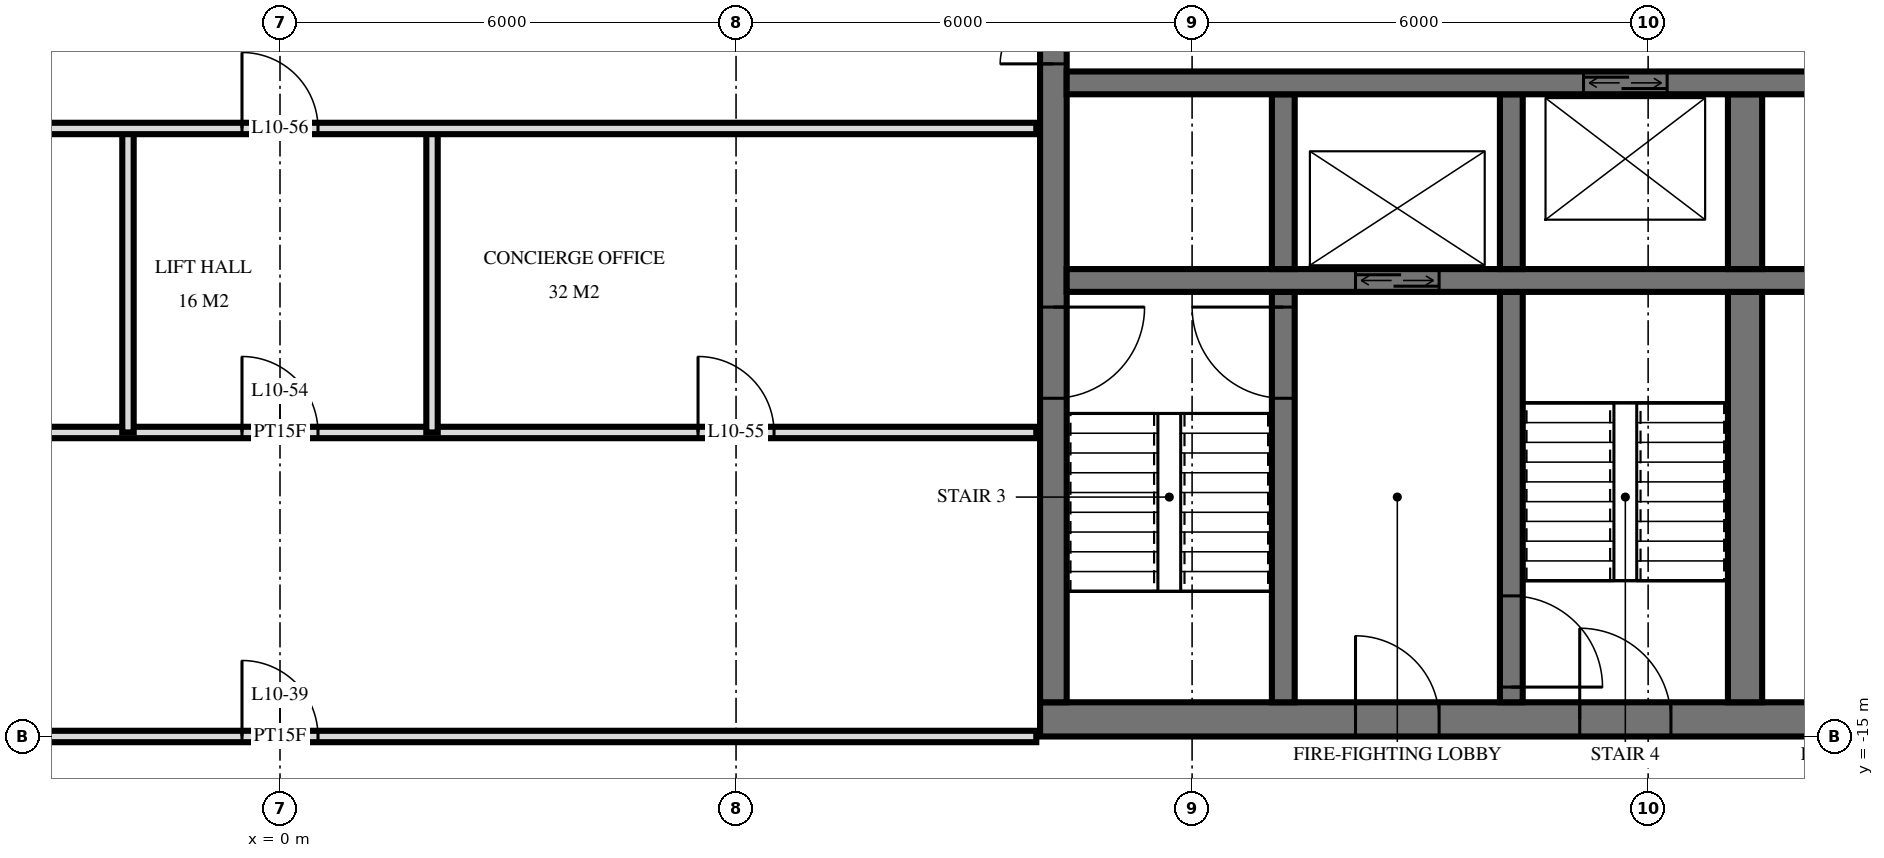
"""IFC4 building model, lengths in metres.
Left out: names, types, materials, properties, quantities, classifications, styles, units other than length and angle.
Written with IfcOpenShell. Run it as: python <this file> out.ifc"""

import sys

from ifc_helpers import new_model, si_unit, direction, frame, frame_2d, origin, place, context, subcontext, project, spatial, rectangle, extrude, element, fill, save


model = new_model("IFC4")
c1 = context("Model", 3, precision=1e-05, world=origin(), true_north=direction((0.0, 1.0)))
c2 = subcontext(c1, "Body", "Model", "MODEL_VIEW")
j1 = project(units=[si_unit("LENGTHUNIT", "METRE"), si_unit("PLANEANGLEUNIT", "RADIAN")], contexts=[c1])
p1 = place(None, origin())
s1 = spatial("IfcSite", under=j1, at=p1, CompositionType="ELEMENT")
p2 = place(p1, origin())
s2 = spatial("IfcBuilding", under=s1, at=p2, CompositionType="ELEMENT")
p3 = place(p2, frame((0.0, 0.0, 45.6)))
s3 = spatial("IfcBuildingStorey", under=s2, at=p3, CompositionType="ELEMENT", Elevation=45.6)
p4 = place(p3, frame((10.0, -14.775, 0.0), z_axis=(0.0, 0.0, 1.0), x_axis=(1.0, 0.0, 0.0)))
e1 = element("IfcWall", 1, at=p4, inside=s3, PredefinedType="SHEAR", context=c2, shape_type="SweptSolid", body=[
    extrude(rectangle(XDim=19.5, YDim=0.45, at=frame_2d((9.75, 0.0))), origin(), (0.0, 0.0, 1.0), 3.6),
])
p5 = place(p4, frame((7.1, 0.0, 0.0)))
e2 = element("IfcOpeningElement", 2, at=p5, cuts=e1, PredefinedType="OPENING", context=c2, shape_type="SweptSolid", body=[
    extrude(rectangle(XDim=1.2, YDim=2.1, at=frame_2d((0.6, 1.05))), frame((0.0, 0.235, 0.0), z_axis=(0.0, -1.0, 0.0), x_axis=(1.0, 0.0, 0.0)), (0.0, 0.0, 1.0), 0.47),
])
p6 = place(p4, frame((4.15, 0.0, 0.0)))
e3 = element("IfcOpeningElement", 3, at=p6, cuts=e1, PredefinedType="OPENING", context=c2, shape_type="SweptSolid", body=[
    extrude(rectangle(XDim=1.1, YDim=2.1, at=frame_2d((0.55, 1.05))), frame((0.0, 0.235, 0.0), z_axis=(0.0, -1.0, 0.0), x_axis=(1.0, 0.0, 0.0)), (0.0, 0.0, 1.0), 0.47),
])
p7 = place(p4, frame((10.1, 0.0, 0.0)))
e4 = element("IfcOpeningElement", 4, at=p7, cuts=e1, PredefinedType="OPENING", context=c2, shape_type="SweptSolid", body=[
    extrude(rectangle(XDim=0.9, YDim=2.1, at=frame_2d((0.45, 1.05))), frame((0.0, 0.235, 0.0), z_axis=(0.0, -1.0, 0.0), x_axis=(1.0, 0.0, 0.0)), (0.0, 0.0, 1.0), 0.47),
])
p8 = place(p4, frame((12.45, 0.0, 0.0)))
e5 = element("IfcOpeningElement", 5, at=p8, cuts=e1, PredefinedType="OPENING", context=c2, shape_type="SweptSolid", body=[
    extrude(rectangle(XDim=1.0, YDim=2.1, at=frame_2d((0.5, 1.05))), frame((0.0, 0.235, 0.0), z_axis=(0.0, -1.0, 0.0), x_axis=(1.0, 0.0, 0.0)), (0.0, 0.0, 1.0), 0.47),
])
p9 = place(p4, frame((14.913, 0.0, 0.0)))
e6 = element("IfcOpeningElement", 6, at=p9, cuts=e1, PredefinedType="OPENING", context=c2, shape_type="SweptSolid", body=[
    extrude(rectangle(XDim=1.0, YDim=2.1, at=frame_2d((0.5, 1.05))), frame((0.0, 0.235, 0.0), z_axis=(0.0, -1.0, 0.0), x_axis=(1.0, 0.0, 0.0)), (0.0, 0.0, 1.0), 0.47),
])
p10 = place(p4, frame((16.65, 0.0, 0.0)))
e7 = element("IfcOpeningElement", 7, at=p10, cuts=e1, PredefinedType="OPENING", context=c2, shape_type="SweptSolid", body=[
    extrude(rectangle(XDim=1.0, YDim=2.1, at=frame_2d((0.5, 1.05))), frame((0.0, 0.235, 0.0), z_axis=(0.0, -1.0, 0.0), x_axis=(1.0, 0.0, 0.0)), (0.0, 0.0, 1.0), 0.47),
])
p11 = place(p4, frame((18.025, 0.0, 0.0)))
e8 = element("IfcOpeningElement", 8, at=p11, cuts=e1, PredefinedType="OPENING", context=c2, shape_type="SweptSolid", body=[
    extrude(rectangle(XDim=1.0, YDim=2.1, at=frame_2d((0.5, 1.05))), frame((0.0, 0.235, 0.0), z_axis=(0.0, -1.0, 0.0), x_axis=(1.0, 0.0, 0.0)), (0.0, 0.0, 1.0), 0.47),
])
p12 = place(p3, frame((10.175, -14.55, 0.0), z_axis=(0.0, 0.0, 1.0), x_axis=(0.0, 1.0, 0.0)))
e9 = element("IfcWall", 9, at=p12, inside=s3, PredefinedType="SHEAR", context=c2, shape_type="SweptSolid", body=[
    extrude(rectangle(XDim=14.1, YDim=0.35, at=frame_2d((7.05, 0.0))), origin(), (0.0, 0.0, 1.0), 3.6),
])
p13 = place(p12, frame((8.4, 0.0, 0.0)))
e10 = element("IfcOpeningElement", 10, at=p13, cuts=e9, PredefinedType="OPENING", context=c2, shape_type="SweptSolid", body=[
    extrude(rectangle(XDim=1.4, YDim=2.4, at=frame_2d((0.7, 1.2))), frame((0.0, 0.185, 0.0), z_axis=(0.0, -1.0, 0.0), x_axis=(1.0, 0.0, 0.0)), (0.0, 0.0, 1.0), 0.37),
])
p14 = place(p12, frame((10.0, 0.0, 0.0)))
e11 = element("IfcOpeningElement", 11, at=p14, cuts=e9, PredefinedType="OPENING", context=c2, shape_type="SweptSolid", body=[
    extrude(rectangle(XDim=1.4, YDim=2.4, at=frame_2d((0.7, 1.2))), frame((0.0, 0.185, 0.0), z_axis=(0.0, -1.0, 0.0), x_axis=(1.0, 0.0, 0.0)), (0.0, 0.0, 1.0), 0.37),
])
p15 = place(p12, frame((4.0, 0.0, 0.0)))
e12 = element("IfcOpeningElement", 12, at=p15, cuts=e9, PredefinedType="OPENING", context=c2, shape_type="SweptSolid", body=[
    extrude(rectangle(XDim=1.2, YDim=2.1, at=frame_2d((0.6, 1.05))), frame((0.0, 0.185, 0.0), z_axis=(0.0, -1.0, 0.0), x_axis=(1.0, 0.0, 0.0)), (0.0, 0.0, 1.0), 0.37),
])
p16 = place(p3, frame((10.35, -6.4, 0.0), z_axis=(0.0, 0.0, 1.0), x_axis=(1.0, 0.0, 0.0)))
e13 = element("IfcWall", 13, at=p16, inside=s3, PredefinedType="SHEAR", context=c2, shape_type="SweptSolid", body=[
    extrude(rectangle(XDim=18.7, YDim=0.3, at=frame_2d((9.35, 0.0))), origin(), (0.0, 0.0, 1.0), 3.6),
])
p17 = place(p16, frame((14.65, 0.0, 0.0)))
e14 = element("IfcOpeningElement", 14, at=p17, cuts=e13, PredefinedType="OPENING", context=c2, shape_type="SweptSolid", body=[
    extrude(rectangle(XDim=1.1, YDim=2.1, at=frame_2d((0.55, 1.05))), frame((0.0, 0.16, 0.0), z_axis=(0.0, -1.0, 0.0), x_axis=(1.0, 0.0, 0.0)), (0.0, 0.0, 1.0), 0.32),
])
p18 = place(p16, frame((17.05, 0.0, 0.0)))
e15 = element("IfcOpeningElement", 15, at=p18, cuts=e13, PredefinedType="OPENING", context=c2, shape_type="SweptSolid", body=[
    extrude(rectangle(XDim=1.1, YDim=2.1, at=frame_2d((0.55, 1.05))), frame((0.0, 0.16, 0.0), z_axis=(0.0, -1.0, 0.0), x_axis=(1.0, 0.0, 0.0)), (0.0, 0.0, 1.0), 0.32),
])
p19 = place(p16, frame((6.8, 0.0, 0.0)))
e16 = element("IfcOpeningElement", 16, at=p19, cuts=e13, PredefinedType="OPENING", context=c2, shape_type="SweptSolid", body=[
    extrude(rectangle(XDim=1.1, YDim=2.1, at=frame_2d((0.55, 1.05))), frame((0.0, 0.16, 0.0), z_axis=(0.0, -1.0, 0.0), x_axis=(1.0, 0.0, 0.0)), (0.0, 0.0, 1.0), 0.32),
])
p20 = place(p16, frame((12.1, 0.0, 0.0)))
e17 = element("IfcOpeningElement", 17, at=p20, cuts=e13, PredefinedType="OPENING", context=c2, shape_type="SweptSolid", body=[
    extrude(rectangle(XDim=1.0, YDim=2.1, at=frame_2d((0.5, 1.05))), frame((0.0, 0.16, 0.0), z_axis=(0.0, -1.0, 0.0), x_axis=(1.0, 0.0, 0.0)), (0.0, 0.0, 1.0), 0.32),
])
p21 = place(p3, frame((10.35, -9.0, 0.0), z_axis=(0.0, 0.0, 1.0), x_axis=(1.0, 0.0, 0.0)))
e18 = element("IfcWall", 18, at=p21, inside=s3, PredefinedType="SHEAR", context=c2, shape_type="SweptSolid", body=[
    extrude(rectangle(XDim=18.7, YDim=0.3, at=frame_2d((9.35, 0.0))), origin(), (0.0, 0.0, 1.0), 3.6),
])
p22 = place(p21, frame((3.8, 0.0, 0.0)))
e19 = element("IfcOpeningElement", 19, at=p22, cuts=e18, PredefinedType="OPENING", context=c2, shape_type="SweptSolid", body=[
    extrude(rectangle(XDim=1.1, YDim=2.1, at=frame_2d((0.55, 1.05))), frame((0.0, 0.16, 0.0), z_axis=(0.0, -1.0, 0.0), x_axis=(1.0, 0.0, 0.0)), (0.0, 0.0, 1.0), 0.32),
])
p23 = place(p3, frame((13.2, -8.85, 0.0), z_axis=(0.0, 0.0, 1.0), x_axis=(0.0, 1.0, 0.0)))
e20 = element("IfcWall", 20, at=p23, inside=s3, PredefinedType="SHEAR", context=c2, shape_type="SweptSolid", body=[
    extrude(rectangle(XDim=2.3, YDim=0.3, at=frame_2d((1.15, 0.0))), origin(), (0.0, 0.0, 1.0), 3.6),
])
p24 = place(p3, frame((13.2, -14.55, 0.0), z_axis=(0.0, 0.0, 1.0), x_axis=(0.0, 1.0, 0.0)))
e21 = element("IfcWall", 21, at=p24, inside=s3, PredefinedType="SHEAR", context=c2, shape_type="SweptSolid", body=[
    extrude(rectangle(XDim=5.4, YDim=0.3, at=frame_2d((2.7, 0.0))), origin(), (0.0, 0.0, 1.0), 3.6),
])
p25 = place(p24, frame((4.0, 0.0, 0.0)))
e22 = element("IfcOpeningElement", 22, at=p25, cuts=e21, PredefinedType="OPENING", context=c2, shape_type="SweptSolid", body=[
    extrude(rectangle(XDim=1.2, YDim=2.1, at=frame_2d((0.6, 1.05))), frame((0.0, 0.16, 0.0), z_axis=(0.0, -1.0, 0.0), x_axis=(1.0, 0.0, 0.0)), (0.0, 0.0, 1.0), 0.32),
])
p26 = place(p3, frame((16.2, -8.85, 0.0), z_axis=(0.0, 0.0, 1.0), x_axis=(0.0, 1.0, 0.0)))
e23 = element("IfcWall", 23, at=p26, inside=s3, PredefinedType="SHEAR", context=c2, shape_type="SweptSolid", body=[
    extrude(rectangle(XDim=2.3, YDim=0.3, at=frame_2d((1.15, 0.0))), origin(), (0.0, 0.0, 1.0), 3.6),
])
p27 = place(p3, frame((16.2, -14.55, 0.0), z_axis=(0.0, 0.0, 1.0), x_axis=(0.0, 1.0, 0.0)))
e24 = element("IfcWall", 24, at=p27, inside=s3, PredefinedType="SHEAR", context=c2, shape_type="SweptSolid", body=[
    extrude(rectangle(XDim=5.4, YDim=0.3, at=frame_2d((2.7, 0.0))), origin(), (0.0, 0.0, 1.0), 3.6),
])
p28 = place(p27, frame((0.2, 0.0, 0.0)))
e25 = element("IfcOpeningElement", 25, at=p28, cuts=e24, PredefinedType="OPENING", context=c2, shape_type="SweptSolid", body=[
    extrude(rectangle(XDim=1.2, YDim=2.1, at=frame_2d((0.6, 1.05))), frame((0.0, 0.16, 0.0), z_axis=(0.0, -1.0, 0.0), x_axis=(1.0, 0.0, 0.0)), (0.0, 0.0, 1.0), 0.32),
])
p29 = place(p3, frame((19.275, -8.85, 0.0), z_axis=(0.0, 0.0, 1.0), x_axis=(0.0, 1.0, 0.0)))
e26 = element("IfcWall", 26, at=p29, inside=s3, PredefinedType="SHEAR", context=c2, shape_type="SweptSolid", body=[
    extrude(rectangle(XDim=2.3, YDim=0.45, at=frame_2d((1.15, 0.0))), origin(), (0.0, 0.0, 1.0), 3.6),
])
p30 = place(p3, frame((19.275, -14.55, 0.0), z_axis=(0.0, 0.0, 1.0), x_axis=(0.0, 1.0, 0.0)))
e27 = element("IfcWall", 27, at=p30, inside=s3, PredefinedType="SHEAR", context=c2, shape_type="SweptSolid", body=[
    extrude(rectangle(XDim=5.4, YDim=0.45, at=frame_2d((2.7, 0.0))), origin(), (0.0, 0.0, 1.0), 3.6),
])
for number, where, z_axis, x_axis in (
    (28, (2.0, -11.0, 0.0), (0.0, 0.0, 1.0), (0.0, 1.0, 0.0)),
    (29, (-2.0, -11.0, 0.0), (0.0, 0.0, 1.0), (0.0, 1.0, 0.0)),
):
    element("IfcWall", number, at=place(p3, frame(where, z_axis=z_axis, x_axis=x_axis)), inside=s3, PredefinedType="PARTITIONING", context=c2, shape_type="SweptSolid", body=[
        extrude(rectangle(XDim=4.0, YDim=0.15, at=frame_2d((2.0, 0.0))), origin(), (0.0, 0.0, 1.0), 3.32),
    ])
p31 = place(p3, frame((-9.95, -15.0, 0.0), z_axis=(0.0, 0.0, 1.0), x_axis=(1.0, 0.0, 0.0)))
e30 = element("IfcWall", 30, at=p31, inside=s3, PredefinedType="PARTITIONING", context=c2, shape_type="SweptSolid", body=[
    extrude(rectangle(XDim=19.9, YDim=0.15, at=frame_2d((9.95, 0.0))), origin(), (0.0, 0.0, 1.0), 2.684),
])
p32 = place(p31, frame((9.45, 0.0, 0.0)))
e31 = element("IfcOpeningElement", 31, at=p32, cuts=e30, PredefinedType="OPENING", context=c2, shape_type="SweptSolid", body=[
    extrude(rectangle(XDim=1.0, YDim=2.1, at=frame_2d((0.5, 1.05))), frame((0.0, 0.085, 0.0), z_axis=(0.0, -1.0, 0.0), x_axis=(1.0, 0.0, 0.0)), (0.0, 0.0, 1.0), 0.17),
])
p33 = place(p3, frame((-9.95, -11.0, 0.0), z_axis=(0.0, 0.0, 1.0), x_axis=(1.0, 0.0, 0.0)))
e32 = element("IfcWall", 32, at=p33, inside=s3, PredefinedType="PARTITIONING", context=c2, shape_type="SweptSolid", body=[
    extrude(rectangle(XDim=19.9, YDim=0.15, at=frame_2d((9.95, 0.0))), origin(), (0.0, 0.0, 1.0), 3.32),
])
p34 = place(p33, frame((9.45, 0.0, 0.0)))
e33 = element("IfcOpeningElement", 33, at=p34, cuts=e32, PredefinedType="OPENING", context=c2, shape_type="SweptSolid", body=[
    extrude(rectangle(XDim=1.0, YDim=2.1, at=frame_2d((0.5, 1.05))), frame((0.0, 0.085, 0.0), z_axis=(0.0, -1.0, 0.0), x_axis=(1.0, 0.0, 0.0)), (0.0, 0.0, 1.0), 0.17),
])
p35 = place(p33, frame((15.45, 0.0, 0.0)))
e34 = element("IfcOpeningElement", 34, at=p35, cuts=e32, PredefinedType="OPENING", context=c2, shape_type="SweptSolid", body=[
    extrude(rectangle(XDim=1.0, YDim=2.1, at=frame_2d((0.5, 1.05))), frame((0.0, 0.085, 0.0), z_axis=(0.0, -1.0, 0.0), x_axis=(1.0, 0.0, 0.0)), (0.0, 0.0, 1.0), 0.17),
])
p36 = place(p3, frame((-9.95, -7.0, 0.0), z_axis=(0.0, 0.0, 1.0), x_axis=(1.0, 0.0, 0.0)))
e35 = element("IfcWall", 35, at=p36, inside=s3, PredefinedType="PARTITIONING", context=c2, shape_type="SweptSolid", body=[
    extrude(rectangle(XDim=19.9, YDim=0.15, at=frame_2d((9.95, 0.0))), origin(), (0.0, 0.0, 1.0), 3.32),
])
p37 = place(p36, frame((9.45, 0.0, 0.0)))
e36 = element("IfcOpeningElement", 36, at=p37, cuts=e35, PredefinedType="OPENING", context=c2, shape_type="SweptSolid", body=[
    extrude(rectangle(XDim=1.0, YDim=2.1, at=frame_2d((0.5, 1.05))), frame((0.0, 0.085, 0.0), z_axis=(0.0, -1.0, 0.0), x_axis=(1.0, 0.0, 0.0)), (0.0, 0.0, 1.0), 0.17),
])
p38 = place(p36, frame((3.45, 0.0, 0.0)))
e37 = element("IfcOpeningElement", 37, at=p38, cuts=e35, PredefinedType="OPENING", context=c2, shape_type="SweptSolid", body=[
    extrude(rectangle(XDim=1.0, YDim=2.1, at=frame_2d((0.5, 1.05))), frame((0.0, 0.085, 0.0), z_axis=(0.0, -1.0, 0.0), x_axis=(1.0, 0.0, 0.0)), (0.0, 0.0, 1.0), 0.17),
])
p39 = place(p22, origin())
e38 = element("IfcDoor", 38, at=p39, inside=s3, OperationType="DOUBLE_DOOR_SLIDING", PredefinedType="USERDEFINED", context=c2, shape_type="SweptSolid", body=[
    extrude(rectangle(XDim=1.1, YDim=2.1, at=frame_2d((0.55, 1.05))), frame((0.0, 0.025, 0.0), z_axis=(0.0, -1.0, 0.0), x_axis=(1.0, 0.0, 0.0)), (0.0, 0.0, 1.0), 0.05),
])
fill(e19, e38)
p40 = place(p19, origin())
e39 = element("IfcDoor", 39, at=p40, inside=s3, OperationType="DOUBLE_DOOR_SLIDING", PredefinedType="USERDEFINED", context=c2, shape_type="SweptSolid", body=[
    extrude(rectangle(XDim=1.1, YDim=2.1, at=frame_2d((0.55, 1.05))), frame((0.0, 0.025, 0.0), z_axis=(0.0, -1.0, 0.0), x_axis=(1.0, 0.0, 0.0)), (0.0, 0.0, 1.0), 0.05),
])
fill(e16, e39)
p41 = place(p13, origin())
e40 = element("IfcDoor", 40, at=p41, inside=s3, OperationType="DOUBLE_DOOR_SINGLE_SWING", PredefinedType="DOOR", context=c2, shape_type="SweptSolid", body=[
    extrude(rectangle(XDim=1.4, YDim=2.4, at=frame_2d((0.7, 1.2))), frame((0.0, 0.025, 0.0), z_axis=(0.0, -1.0, 0.0), x_axis=(1.0, 0.0, 0.0)), (0.0, 0.0, 1.0), 0.05),
])
fill(e10, e40)
p42 = place(p15, frame((0.6, 0.0, 0.0), z_axis=(0.0, 0.0, 1.0), x_axis=(-1.0, 0.0, 0.0)))
e41 = element("IfcDoor", 41, at=p42, inside=s3, OperationType="SINGLE_SWING_RIGHT", PredefinedType="DOOR", context=c2, shape_type="SweptSolid", body=[
    extrude(rectangle(XDim=1.2, YDim=2.1, at=frame_2d((0.0, 1.05))), frame((0.0, -0.025, 0.0), z_axis=(0.0, 1.0, 0.0), x_axis=(-1.0, 0.0, 0.0)), (0.0, 0.0, 1.0), 0.05),
])
fill(e12, e41)
p43 = place(p5, origin())
e42 = element("IfcDoor", 42, at=p43, inside=s3, OperationType="SINGLE_SWING_RIGHT", PredefinedType="DOOR", context=c2, shape_type="SweptSolid", body=[
    extrude(rectangle(XDim=1.2, YDim=2.1, at=frame_2d((0.6, 1.05))), frame((0.0, 0.025, 0.0), z_axis=(0.0, -1.0, 0.0), x_axis=(1.0, 0.0, 0.0)), (0.0, 0.0, 1.0), 0.05),
])
fill(e2, e42)
p44 = place(p6, origin())
e43 = element("IfcDoor", 43, at=p44, inside=s3, OperationType="SINGLE_SWING_RIGHT", PredefinedType="DOOR", context=c2, shape_type="SweptSolid", body=[
    extrude(rectangle(XDim=1.1, YDim=2.1, at=frame_2d((0.55, 1.05))), frame((0.0, 0.025, 0.0), z_axis=(0.0, -1.0, 0.0), x_axis=(1.0, 0.0, 0.0)), (0.0, 0.0, 1.0), 0.05),
])
fill(e3, e43)
p45 = place(p25, origin())
e44 = element("IfcDoor", 44, at=p45, inside=s3, OperationType="SINGLE_SWING_LEFT", PredefinedType="DOOR", context=c2, shape_type="SweptSolid", body=[
    extrude(rectangle(XDim=1.2, YDim=2.1, at=frame_2d((0.6, 1.05))), frame((0.0, 0.025, 0.0), z_axis=(0.0, -1.0, 0.0), x_axis=(1.0, 0.0, 0.0)), (0.0, 0.0, 1.0), 0.05),
])
fill(e22, e44)
p46 = place(p28, frame((0.6, 0.0, 0.0), z_axis=(0.0, 0.0, 1.0), x_axis=(-1.0, 0.0, 0.0)))
e45 = element("IfcDoor", 45, at=p46, inside=s3, OperationType="SINGLE_SWING_LEFT", PredefinedType="DOOR", context=c2, shape_type="SweptSolid", body=[
    extrude(rectangle(XDim=1.2, YDim=2.1, at=frame_2d((0.0, 1.05))), frame((0.0, -0.025, 0.0), z_axis=(0.0, 1.0, 0.0), x_axis=(-1.0, 0.0, 0.0)), (0.0, 0.0, 1.0), 0.05),
])
fill(e25, e45)
p47 = place(p32, origin())
e46 = element("IfcDoor", 46, at=p47, inside=s3, OperationType="SINGLE_SWING_RIGHT", PredefinedType="DOOR", context=c2, shape_type="SweptSolid", body=[
    extrude(rectangle(XDim=1.0, YDim=2.1, at=frame_2d((0.5, 1.05))), frame((0.0, 0.025, 0.0), z_axis=(0.0, -1.0, 0.0), x_axis=(1.0, 0.0, 0.0)), (0.0, 0.0, 1.0), 0.05),
])
fill(e31, e46)
p48 = place(p34, origin())
e47 = element("IfcDoor", 47, at=p48, inside=s3, OperationType="SINGLE_SWING_RIGHT", PredefinedType="DOOR", context=c2, shape_type="SweptSolid", body=[
    extrude(rectangle(XDim=1.0, YDim=2.1, at=frame_2d((0.5, 1.05))), frame((0.0, 0.025, 0.0), z_axis=(0.0, -1.0, 0.0), x_axis=(1.0, 0.0, 0.0)), (0.0, 0.0, 1.0), 0.05),
])
fill(e33, e47)
p49 = place(p35, origin())
e48 = element("IfcDoor", 48, at=p49, inside=s3, OperationType="SINGLE_SWING_RIGHT", PredefinedType="DOOR", context=c2, shape_type="SweptSolid", body=[
    extrude(rectangle(XDim=1.0, YDim=2.1, at=frame_2d((0.5, 1.05))), frame((0.0, 0.025, 0.0), z_axis=(0.0, -1.0, 0.0), x_axis=(1.0, 0.0, 0.0)), (0.0, 0.0, 1.0), 0.05),
])
fill(e34, e48)
p50 = place(p37, origin())
e49 = element("IfcDoor", 49, at=p50, inside=s3, OperationType="SINGLE_SWING_RIGHT", PredefinedType="DOOR", context=c2, shape_type="SweptSolid", body=[
    extrude(rectangle(XDim=1.0, YDim=2.1, at=frame_2d((0.5, 1.05))), frame((0.0, 0.025, 0.0), z_axis=(0.0, -1.0, 0.0), x_axis=(1.0, 0.0, 0.0)), (0.0, 0.0, 1.0), 0.05),
])
fill(e36, e49)
save(model, sys.argv[1])
